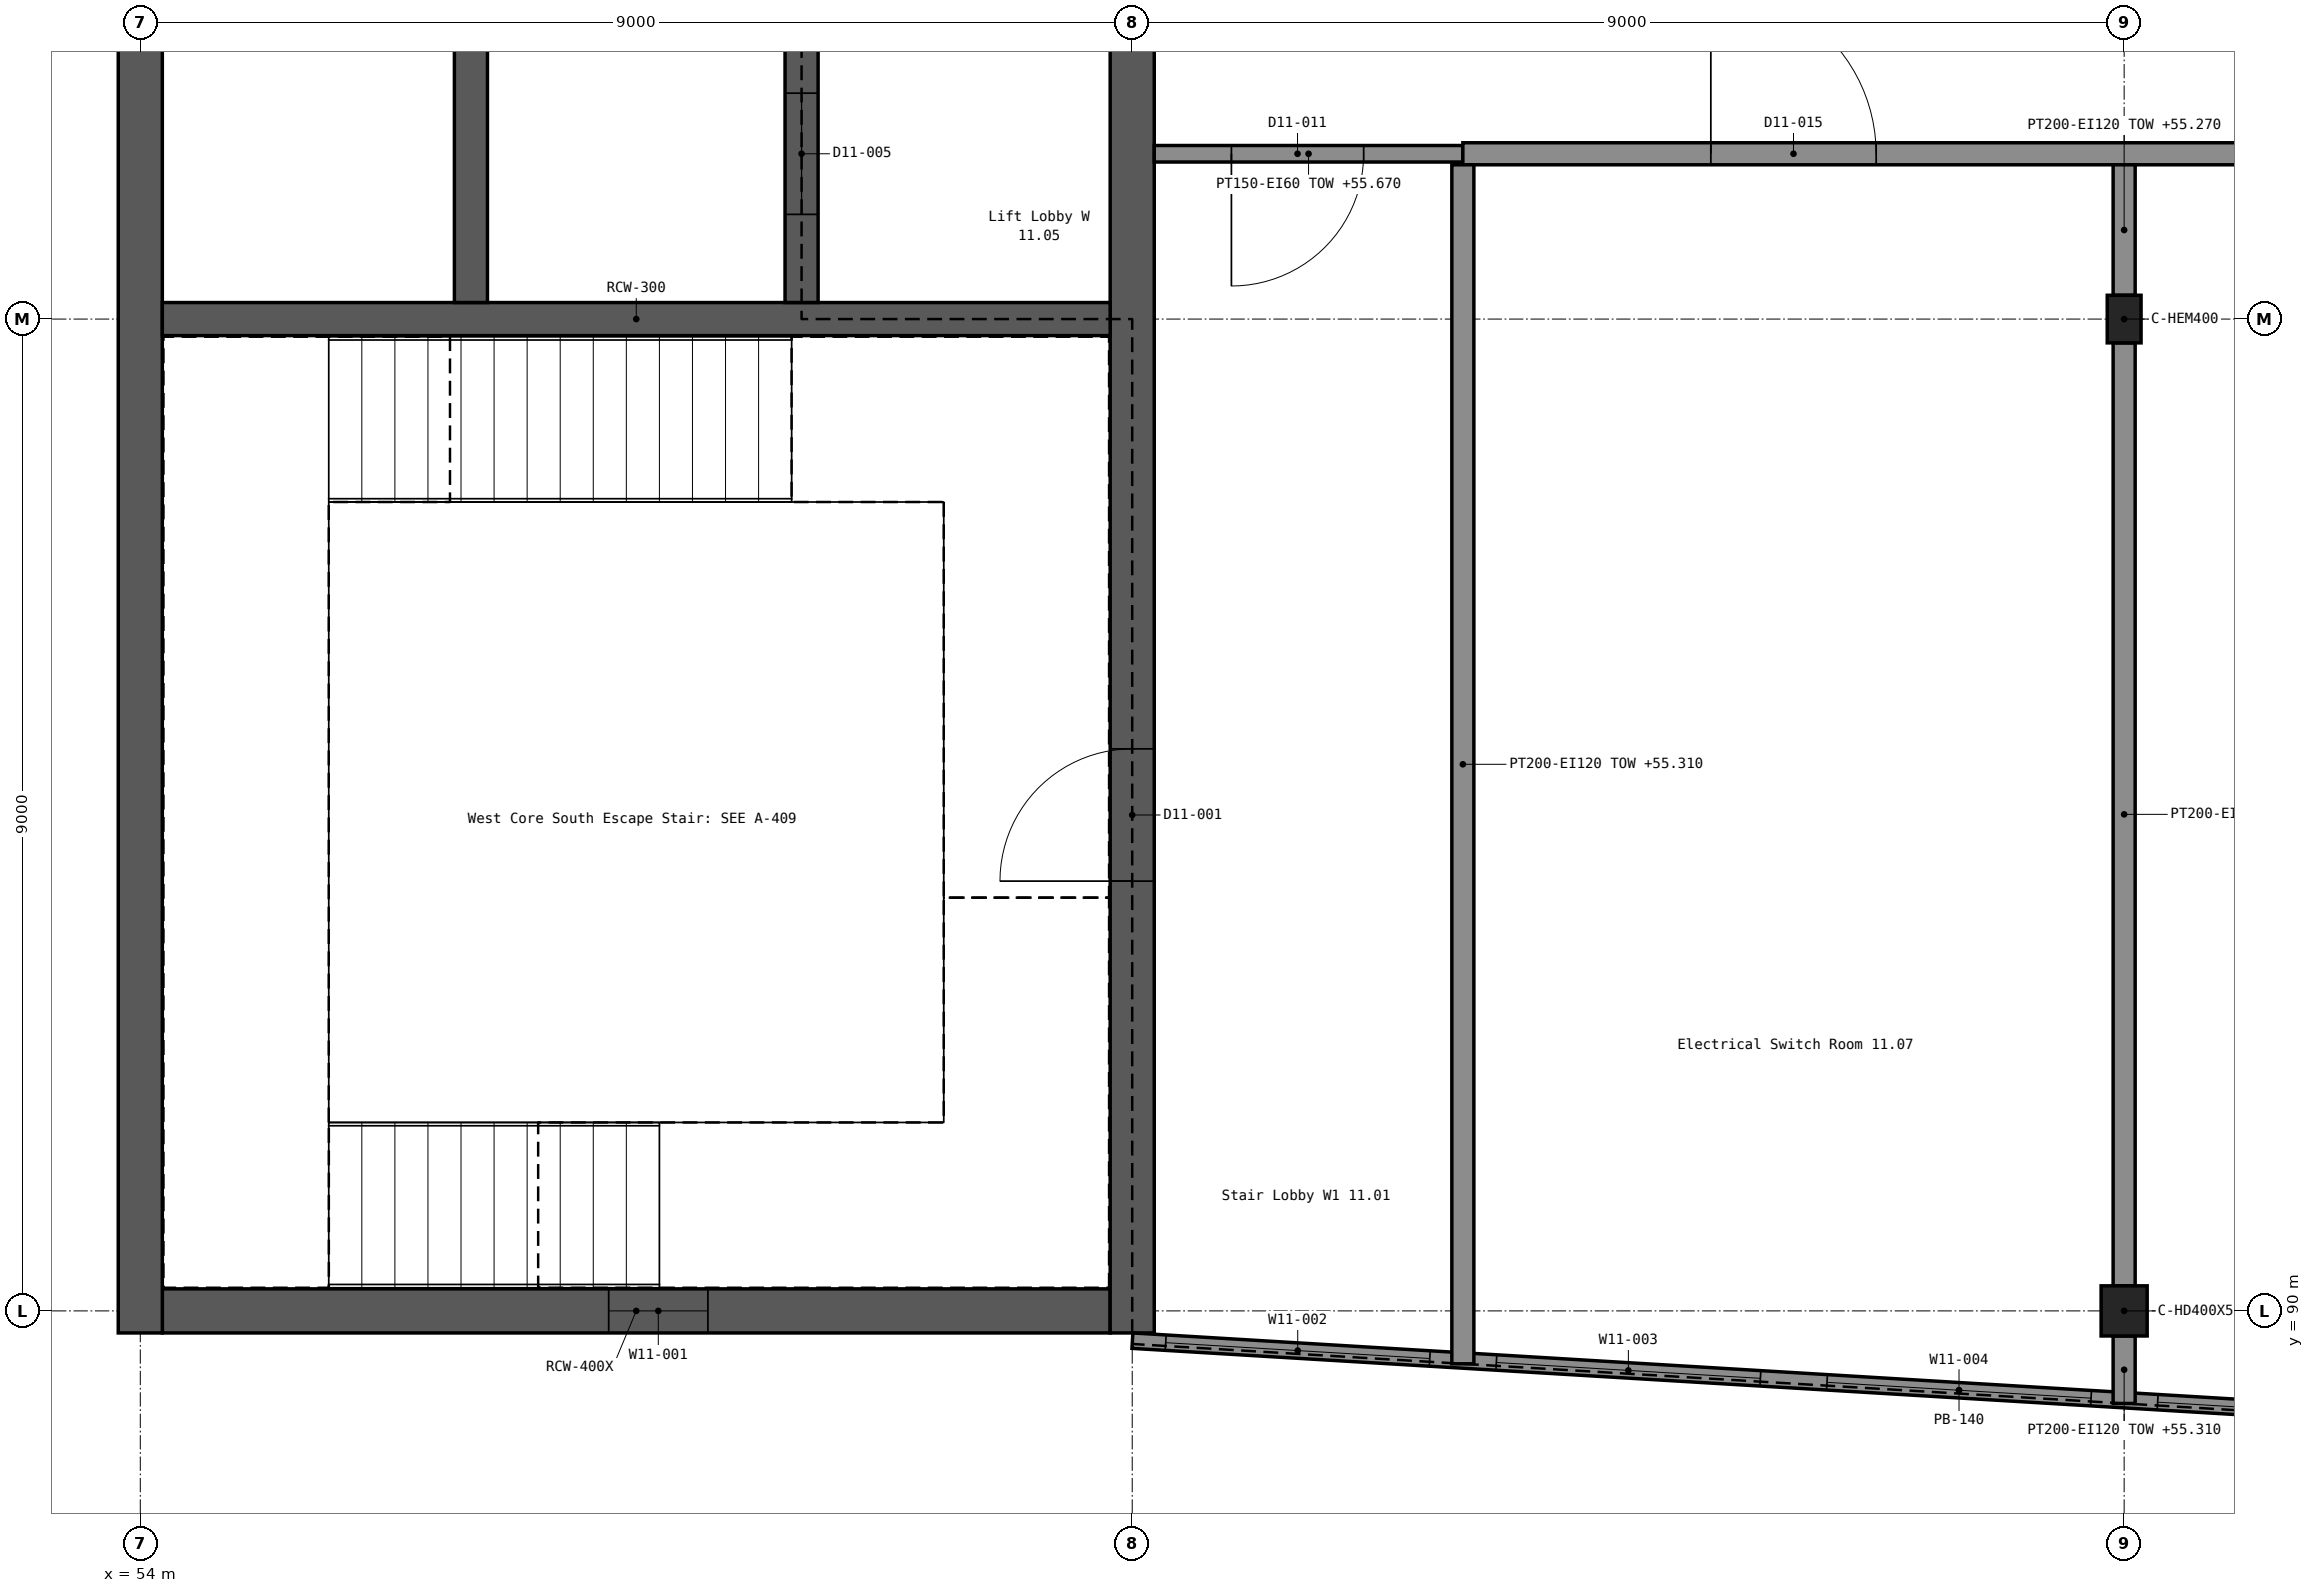
"""IFC4 building model, lengths in metres.
Left out: names, types, materials, properties, quantities, classifications, styles, units other than length and angle.
Written with IfcOpenShell. Run it as: python <this file> out.ifc"""

import sys

from ifc_helpers import new_model, si_unit, direction, frame, frame_2d, origin, origin_2d, place, context, subcontext, project, spatial, rectangle, i_section, extrude, element, fill, save


model = new_model("IFC4")
c1 = context("Model", 3, precision=1e-05, world=origin(), true_north=direction((0.0, 1.0)))
c2 = subcontext(c1, "Body", "Model", "MODEL_VIEW")
j1 = project(units=[si_unit("LENGTHUNIT", "METRE"), si_unit("PLANEANGLEUNIT", "RADIAN")], contexts=[c1])
p1 = place(None, origin())
s1 = spatial("IfcSite", under=j1, at=p1, CompositionType="ELEMENT")
p2 = place(p1, origin())
s2 = spatial("IfcBuilding", under=s1, at=p2, CompositionType="ELEMENT")
p3 = place(p2, frame((0.0, 0.0, 51.9)))
s3 = spatial("IfcBuildingStorey", under=s2, at=p3, CompositionType="ELEMENT", Elevation=51.9)
p4 = place(p3, frame((54.2, 90.0, 0.0), z_axis=(0.0, 0.0, 1.0), x_axis=(1.0, 0.0, 0.0)))
e1 = element("IfcWall", 1, at=p4, inside=s3, PredefinedType="SHEAR", context=c2, shape_type="SweptSolid", body=[
    extrude(rectangle(XDim=8.6, YDim=0.4, at=frame_2d((4.3, 0.0))), origin(), (0.0, 0.0, 1.0), 3.9),
])
p5 = place(p4, frame((4.05, 0.0, 1.2)))
e2 = element("IfcOpeningElement", 2, at=p5, cuts=e1, PredefinedType="OPENING", context=c2, shape_type="SweptSolid", body=[
    extrude(rectangle(XDim=0.9, YDim=1.5, at=frame_2d((0.45, 0.75))), frame((0.0, 0.211, 0.0), z_axis=(0.0, -1.0, 0.0), x_axis=(1.0, 0.0, 0.0)), (0.0, 0.0, 1.0), 0.422),
])
p6 = place(p3, frame((54.0, 89.8, 0.0), z_axis=(0.0, 0.0, 1.0), x_axis=(0.0, 1.0, 0.0)))
e3 = element("IfcWall", 3, at=p6, inside=s3, PredefinedType="SHEAR", context=c2, shape_type="SweptSolid", body=[
    extrude(rectangle(XDim=27.4, YDim=0.4, at=frame_2d((13.7, 0.0))), origin(), (0.0, 0.0, 1.0), 3.9),
])
p7 = place(p3, frame((63.0, 89.8, 0.0), z_axis=(0.0, 0.0, 1.0), x_axis=(0.0, 1.0, 0.0)))
e4 = element("IfcWall", 4, at=p7, inside=s3, PredefinedType="SHEAR", context=c2, shape_type="SweptSolid", body=[
    extrude(rectangle(XDim=27.4, YDim=0.4, at=frame_2d((13.7, 0.0))), origin(), (0.0, 0.0, 1.0), 3.9),
])
p8 = place(p7, frame((4.1, 0.0, 0.0)))
e5 = element("IfcOpeningElement", 5, at=p8, cuts=e4, PredefinedType="OPENING", context=c2, shape_type="SweptSolid", body=[
    extrude(rectangle(XDim=1.2, YDim=2.1, at=frame_2d((0.6, 1.05))), frame((0.0, 0.211, 0.0), z_axis=(0.0, -1.0, 0.0), x_axis=(1.0, 0.0, 0.0)), (0.0, 0.0, 1.0), 0.422),
])
p9 = place(p7, frame((22.1, 0.0, 0.0)))
e6 = element("IfcOpeningElement", 6, at=p9, cuts=e4, PredefinedType="OPENING", context=c2, shape_type="SweptSolid", body=[
    extrude(rectangle(XDim=1.2, YDim=2.1, at=frame_2d((0.6, 1.05))), frame((0.0, 0.211, 0.0), z_axis=(0.0, -1.0, 0.0), x_axis=(1.0, 0.0, 0.0)), (0.0, 0.0, 1.0), 0.422),
])
p10 = place(p7, frame((12.5, 0.0, 0.0)))
e7 = element("IfcOpeningElement", 7, at=p10, cuts=e4, PredefinedType="OPENING", context=c2, shape_type="SweptSolid", body=[
    extrude(rectangle(XDim=2.0, YDim=2.1, at=frame_2d((1.0, 1.05))), frame((0.0, 0.211, 0.0), z_axis=(0.0, -1.0, 0.0), x_axis=(1.0, 0.0, 0.0)), (0.0, 0.0, 1.0), 0.422),
])
p11 = place(p3, frame((54.2, 99.0, 0.0), z_axis=(0.0, 0.0, 1.0), x_axis=(1.0, 0.0, 0.0)))
e8 = element("IfcWall", 8, at=p11, inside=s3, PredefinedType="SHEAR", context=c2, shape_type="SweptSolid", body=[
    extrude(rectangle(XDim=8.6, YDim=0.3, at=frame_2d((4.3, 0.0))), origin(), (0.0, 0.0, 1.0), 3.9),
])
p12 = place(p3, frame((57.0, 99.15, 0.0), z_axis=(0.0, 0.0, 1.0), x_axis=(0.0, 1.0, 0.0)))
e9 = element("IfcWall", 9, at=p12, inside=s3, PredefinedType="SHEAR", context=c2, shape_type="SweptSolid", body=[
    extrude(rectangle(XDim=8.7, YDim=0.3, at=frame_2d((4.35, 0.0))), origin(), (0.0, 0.0, 1.0), 3.9),
])
p13 = place(p3, frame((60.0, 99.15, 0.0), z_axis=(0.0, 0.0, 1.0), x_axis=(0.0, 1.0, 0.0)))
e10 = element("IfcWall", 10, at=p13, inside=s3, PredefinedType="SHEAR", context=c2, shape_type="SweptSolid", body=[
    extrude(rectangle(XDim=8.7, YDim=0.3, at=frame_2d((4.35, 0.0))), origin(), (0.0, 0.0, 1.0), 3.9),
])
p14 = place(p13, frame((0.8, 0.0, 0.0)))
e11 = element("IfcOpeningElement", 11, at=p14, cuts=e10, PredefinedType="OPENING", context=c2, shape_type="SweptSolid", body=[
    extrude(rectangle(XDim=1.1, YDim=2.1, at=frame_2d((0.55, 1.05))), frame((0.0, 0.161, 0.0), z_axis=(0.0, -1.0, 0.0), x_axis=(1.0, 0.0, 0.0)), (0.0, 0.0, 1.0), 0.322),
])
p15 = place(p13, frame((3.8, 0.0, 0.0)))
e12 = element("IfcOpeningElement", 12, at=p15, cuts=e10, PredefinedType="OPENING", context=c2, shape_type="SweptSolid", body=[
    extrude(rectangle(XDim=1.1, YDim=2.1, at=frame_2d((0.55, 1.05))), frame((0.0, 0.161, 0.0), z_axis=(0.0, -1.0, 0.0), x_axis=(1.0, 0.0, 0.0)), (0.0, 0.0, 1.0), 0.322),
])
p16 = place(p13, frame((6.8, 0.0, 0.0)))
e13 = element("IfcOpeningElement", 13, at=p16, cuts=e10, PredefinedType="OPENING", context=c2, shape_type="SweptSolid", body=[
    extrude(rectangle(XDim=1.1, YDim=2.1, at=frame_2d((0.55, 1.05))), frame((0.0, 0.161, 0.0), z_axis=(0.0, -1.0, 0.0), x_axis=(1.0, 0.0, 0.0)), (0.0, 0.0, 1.0), 0.322),
])
p17 = place(p3, frame((72.0, 90.0, 0.0), z_axis=(0.0, 0.0, 1.0), x_axis=(1.0, 0.0, 0.0)))
e14 = element("IfcColumn", 14, at=p17, inside=s3, PredefinedType="COLUMN", context=c2, shape_type="SweptSolid", body=[
    extrude(i_section(OverallWidth=0.418, OverallDepth=0.455, WebThickness=0.042, FlangeThickness=0.068, FilletRadius=0.015, at=origin_2d()), origin(), (0.0, 0.0, 1.0), 3.9),
])
p18 = place(p3, frame((72.0, 99.0, 0.0), z_axis=(0.0, 0.0, 1.0), x_axis=(1.0, 0.0, 0.0)))
e15 = element("IfcColumn", 15, at=p18, inside=s3, PredefinedType="COLUMN", context=c2, shape_type="SweptSolid", body=[
    extrude(i_section(OverallWidth=0.307, OverallDepth=0.432, WebThickness=0.021, FlangeThickness=0.04, FilletRadius=0.027, at=origin_2d()), origin(), (0.0, 0.0, 1.0), 3.9),
])
p19 = place(p3, frame((63.002, 89.73, 0.0), z_axis=(0.0, 0.0, 1.0), x_axis=(0.998204262631, -0.059902003846, 0.0)))
e16 = element("IfcWall", 16, at=p19, inside=s3, PredefinedType="SOLIDWALL", context=c2, shape_type="SweptSolid", body=[
    extrude(rectangle(XDim=15.027, YDim=0.14, at=frame_2d((7.514, 0.0))), origin(), (0.0, 0.0, 1.0), 3.9),
])
p20 = place(p19, frame((0.303, 0.0, 0.6)))
e17 = element("IfcOpeningElement", 17, at=p20, cuts=e16, PredefinedType="OPENING", context=c2, shape_type="SweptSolid", body=[
    extrude(rectangle(XDim=2.4, YDim=2.4, at=frame_2d((1.2, 1.2))), frame((0.0, 0.081, 0.0), z_axis=(0.0, -1.0, 0.0), x_axis=(1.0, 0.0, 0.0)), (0.0, 0.0, 1.0), 0.162),
])
p21 = place(p19, frame((3.308, 0.0, 0.6)))
e18 = element("IfcOpeningElement", 18, at=p21, cuts=e16, PredefinedType="OPENING", context=c2, shape_type="SweptSolid", body=[
    extrude(rectangle(XDim=2.4, YDim=2.4, at=frame_2d((1.2, 1.2))), frame((0.0, 0.081, 0.0), z_axis=(0.0, -1.0, 0.0), x_axis=(1.0, 0.0, 0.0)), (0.0, 0.0, 1.0), 0.162),
])
p22 = place(p19, frame((6.313, 0.0, 0.6)))
e19 = element("IfcOpeningElement", 19, at=p22, cuts=e16, PredefinedType="OPENING", context=c2, shape_type="SweptSolid", body=[
    extrude(rectangle(XDim=2.4, YDim=2.4, at=frame_2d((1.2, 1.2))), frame((0.0, 0.081, 0.0), z_axis=(0.0, -1.0, 0.0), x_axis=(1.0, 0.0, 0.0)), (0.0, 0.0, 1.0), 0.162),
])
p23 = place(p19, frame((9.319, 0.0, 0.6)))
e20 = element("IfcOpeningElement", 20, at=p23, cuts=e16, PredefinedType="OPENING", context=c2, shape_type="SweptSolid", body=[
    extrude(rectangle(XDim=2.4, YDim=2.4, at=frame_2d((1.2, 1.2))), frame((0.0, 0.081, 0.0), z_axis=(0.0, -1.0, 0.0), x_axis=(1.0, 0.0, 0.0)), (0.0, 0.0, 1.0), 0.162),
])
p24 = place(p19, frame((12.324, 0.0, 0.6)))
e21 = element("IfcOpeningElement", 21, at=p24, cuts=e16, PredefinedType="OPENING", context=c2, shape_type="SweptSolid", body=[
    extrude(rectangle(XDim=2.4, YDim=2.4, at=frame_2d((1.2, 1.2))), frame((0.0, 0.081, 0.0), z_axis=(0.0, -1.0, 0.0), x_axis=(1.0, 0.0, 0.0)), (0.0, 0.0, 1.0), 0.162),
])
p25 = place(p3, frame((63.2, 100.5, 0.0), z_axis=(0.0, 0.0, 1.0), x_axis=(1.0, 0.0, 0.0)))
e22 = element("IfcWall", 22, at=p25, inside=s3, PredefinedType="PARTITIONING", context=c2, shape_type="SweptSolid", body=[
    extrude(rectangle(XDim=2.8, YDim=0.15, at=frame_2d((1.4, 0.0))), origin(), (0.0, 0.0, 1.0), 3.77),
])
p26 = place(p25, frame((0.7, 0.0, 0.0)))
e23 = element("IfcOpeningElement", 23, at=p26, cuts=e22, PredefinedType="OPENING", context=c2, shape_type="SweptSolid", body=[
    extrude(rectangle(XDim=1.2, YDim=2.1, at=frame_2d((0.6, 1.05))), frame((0.0, 0.086, 0.0), z_axis=(0.0, -1.0, 0.0), x_axis=(1.0, 0.0, 0.0)), (0.0, 0.0, 1.0), 0.172),
])
p27 = place(p3, frame((66.0, 100.5, 0.0), z_axis=(0.0, 0.0, 1.0), x_axis=(1.0, 0.0, 0.0)))
e24 = element("IfcWall", 24, at=p27, inside=s3, PredefinedType="PARTITIONING", context=c2, shape_type="SweptSolid", body=[
    extrude(rectangle(XDim=39.0, YDim=0.2, at=frame_2d((19.5, 0.0))), origin(), (0.0, 0.0, 1.0), 3.77),
])
p28 = place(p27, frame((2.25, 0.0, 0.0)))
e25 = element("IfcOpeningElement", 25, at=p28, cuts=e24, PredefinedType="OPENING", context=c2, shape_type="SweptSolid", body=[
    extrude(rectangle(XDim=1.5, YDim=2.4, at=frame_2d((0.75, 1.2))), frame((0.0, 0.111, 0.0), z_axis=(0.0, -1.0, 0.0), x_axis=(1.0, 0.0, 0.0)), (0.0, 0.0, 1.0), 0.222),
])
p29 = place(p27, frame((13.125, 0.0, 0.0)))
e26 = element("IfcOpeningElement", 26, at=p29, cuts=e24, PredefinedType="OPENING", context=c2, shape_type="SweptSolid", body=[
    extrude(rectangle(XDim=1.5, YDim=2.4, at=frame_2d((0.75, 1.2))), frame((0.0, 0.111, 0.0), z_axis=(0.0, -1.0, 0.0), x_axis=(1.0, 0.0, 0.0)), (0.0, 0.0, 1.0), 0.222),
])
p30 = place(p27, frame((27.75, 0.0, 0.0)))
e27 = element("IfcOpeningElement", 27, at=p30, cuts=e24, PredefinedType="OPENING", context=c2, shape_type="SweptSolid", body=[
    extrude(rectangle(XDim=1.5, YDim=2.4, at=frame_2d((0.75, 1.2))), frame((0.0, 0.111, 0.0), z_axis=(0.0, -1.0, 0.0), x_axis=(1.0, 0.0, 0.0)), (0.0, 0.0, 1.0), 0.222),
])
p31 = place(p27, frame((35.25, 0.0, 0.0)))
e28 = element("IfcOpeningElement", 28, at=p31, cuts=e24, PredefinedType="OPENING", context=c2, shape_type="SweptSolid", body=[
    extrude(rectangle(XDim=1.5, YDim=2.4, at=frame_2d((0.75, 1.2))), frame((0.0, 0.111, 0.0), z_axis=(0.0, -1.0, 0.0), x_axis=(1.0, 0.0, 0.0)), (0.0, 0.0, 1.0), 0.222),
])
p32 = place(p3, frame((66.0, 89.52, 0.0), z_axis=(0.0, 0.0, 1.0), x_axis=(0.0, 1.0, 0.0)))
e29 = element("IfcWall", 29, at=p32, inside=s3, PredefinedType="PARTITIONING", context=c2, shape_type="SweptSolid", body=[
    extrude(rectangle(XDim=10.88, YDim=0.2, at=frame_2d((5.44, 0.0))), origin(), (0.0, 0.0, 1.0), 3.41),
])
p33 = place(p3, frame((72.0, 89.16, 0.0), z_axis=(0.0, 0.0, 1.0), x_axis=(0.0, 1.0, 0.0)))
e30 = element("IfcWall", 30, at=p33, inside=s3, PredefinedType="PARTITIONING", context=c2, shape_type="SweptSolid", body=[
    extrude(rectangle(XDim=0.613, YDim=0.2, at=frame_2d((0.306, 0.0))), origin(), (0.0, 0.0, 1.0), 3.41),
])
p34 = place(p3, frame((72.0, 90.228, 0.0), z_axis=(0.0, 0.0, 1.0), x_axis=(0.0, 1.0, 0.0)))
e31 = element("IfcWall", 31, at=p34, inside=s3, PredefinedType="PARTITIONING", context=c2, shape_type="SweptSolid", body=[
    extrude(rectangle(XDim=8.556, YDim=0.2, at=frame_2d((4.278, 0.0))), origin(), (0.0, 0.0, 1.0), 3.37),
])
p35 = place(p3, frame((72.0, 99.216, 0.0), z_axis=(0.0, 0.0, 1.0), x_axis=(0.0, 1.0, 0.0)))
e32 = element("IfcWall", 32, at=p35, inside=s3, PredefinedType="PARTITIONING", context=c2, shape_type="SweptSolid", body=[
    extrude(rectangle(XDim=1.184, YDim=0.2, at=frame_2d((0.592, 0.0))), origin(), (0.0, 0.0, 1.0), 3.37),
])
p36 = place(p5, origin())
e33 = element("IfcWindow", 33, at=p36, inside=s3, PartitioningType="SINGLE_PANEL", PredefinedType="WINDOW", context=c2, shape_type="SweptSolid", body=[
    extrude(rectangle(XDim=0.9, YDim=1.5, at=frame_2d((0.45, 0.75))), frame((0.0, 0.03, 0.0), z_axis=(0.0, -1.0, 0.0), x_axis=(1.0, 0.0, 0.0)), (0.0, 0.0, 1.0), 0.06),
])
fill(e2, e33)
p37 = place(p20, origin())
e34 = element("IfcWindow", 34, at=p37, inside=s3, PartitioningType="SINGLE_PANEL", PredefinedType="WINDOW", context=c2, shape_type="SweptSolid", body=[
    extrude(rectangle(XDim=2.4, YDim=2.4, at=frame_2d((1.2, 1.2))), frame((0.0, 0.03, 0.0), z_axis=(0.0, -1.0, 0.0), x_axis=(1.0, 0.0, 0.0)), (0.0, 0.0, 1.0), 0.06),
])
fill(e17, e34)
p38 = place(p21, origin())
e35 = element("IfcWindow", 35, at=p38, inside=s3, PartitioningType="SINGLE_PANEL", PredefinedType="WINDOW", context=c2, shape_type="SweptSolid", body=[
    extrude(rectangle(XDim=2.4, YDim=2.4, at=frame_2d((1.2, 1.2))), frame((0.0, 0.03, 0.0), z_axis=(0.0, -1.0, 0.0), x_axis=(1.0, 0.0, 0.0)), (0.0, 0.0, 1.0), 0.06),
])
fill(e18, e35)
p39 = place(p22, origin())
e36 = element("IfcWindow", 36, at=p39, inside=s3, PartitioningType="SINGLE_PANEL", PredefinedType="WINDOW", context=c2, shape_type="SweptSolid", body=[
    extrude(rectangle(XDim=2.4, YDim=2.4, at=frame_2d((1.2, 1.2))), frame((0.0, 0.03, 0.0), z_axis=(0.0, -1.0, 0.0), x_axis=(1.0, 0.0, 0.0)), (0.0, 0.0, 1.0), 0.06),
])
fill(e19, e36)
p40 = place(p23, origin())
e37 = element("IfcWindow", 37, at=p40, inside=s3, PartitioningType="SINGLE_PANEL", PredefinedType="WINDOW", context=c2, shape_type="SweptSolid", body=[
    extrude(rectangle(XDim=2.4, YDim=2.4, at=frame_2d((1.2, 1.2))), frame((0.0, 0.03, 0.0), z_axis=(0.0, -1.0, 0.0), x_axis=(1.0, 0.0, 0.0)), (0.0, 0.0, 1.0), 0.06),
])
fill(e20, e37)
p41 = place(p8, origin())
e38 = element("IfcDoor", 38, at=p41, inside=s3, OperationType="SINGLE_SWING_LEFT", PredefinedType="DOOR", context=c2, shape_type="SweptSolid", body=[
    extrude(rectangle(XDim=1.2, YDim=2.1, at=frame_2d((0.6, 1.05))), frame((0.0, 0.025, 0.0), z_axis=(0.0, -1.0, 0.0), x_axis=(1.0, 0.0, 0.0)), (0.0, 0.0, 1.0), 0.05),
])
fill(e5, e38)
p42 = place(p14, origin())
e39 = element("IfcDoor", 39, at=p42, inside=s3, OperationType="DOUBLE_DOOR_SLIDING", PredefinedType="DOOR", context=c2, shape_type="SweptSolid", body=[
    extrude(rectangle(XDim=1.1, YDim=2.1, at=frame_2d((0.55, 1.05))), frame((0.0, 0.025, 0.0), z_axis=(0.0, -1.0, 0.0), x_axis=(1.0, 0.0, 0.0)), (0.0, 0.0, 1.0), 0.05),
])
fill(e11, e39)
p43 = place(p26, frame((1.2, 0.0, 0.0), z_axis=(0.0, 0.0, 1.0), x_axis=(-1.0, 0.0, 0.0)))
e40 = element("IfcDoor", 40, at=p43, inside=s3, OperationType="SINGLE_SWING_RIGHT", PredefinedType="DOOR", context=c2, shape_type="SweptSolid", body=[
    extrude(rectangle(XDim=1.2, YDim=2.1, at=frame_2d((0.6, 1.05))), frame((0.0, 0.025, 0.0), z_axis=(0.0, -1.0, 0.0), x_axis=(1.0, 0.0, 0.0)), (0.0, 0.0, 1.0), 0.05),
])
fill(e23, e40)
p44 = place(p28, origin())
e41 = element("IfcDoor", 41, at=p44, inside=s3, OperationType="DOUBLE_DOOR_SINGLE_SWING", PredefinedType="DOOR", context=c2, shape_type="SweptSolid", body=[
    extrude(rectangle(XDim=1.5, YDim=2.4, at=frame_2d((0.75, 1.2))), frame((0.0, 0.025, 0.0), z_axis=(0.0, -1.0, 0.0), x_axis=(1.0, 0.0, 0.0)), (0.0, 0.0, 1.0), 0.05),
])
fill(e25, e41)
save(model, sys.argv[1])
